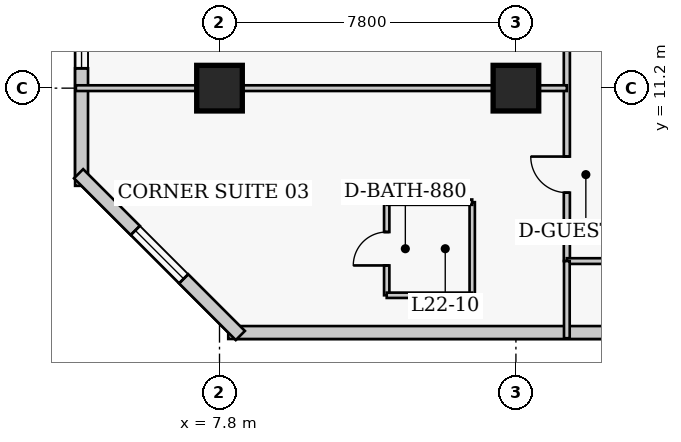
"""IFC4 building model, lengths in metres.
Left out: names, types, materials, properties, quantities, classifications, styles, units other than length and angle.
Written with IfcOpenShell. Run it as: python <this file> out.ifc"""

import sys

from ifc_helpers import new_model, si_unit, direction, frame, frame_2d, origin, origin_2d, place, context, subcontext, project, spatial, rectangle, extrude, element, fill, save


model = new_model("IFC4")
c1 = context("Model", 3, precision=1e-05, world=origin(), true_north=direction((0.0, 1.0)))
c2 = subcontext(c1, "Body", "Model", "MODEL_VIEW")
j1 = project(units=[si_unit("LENGTHUNIT", "METRE"), si_unit("PLANEANGLEUNIT", "RADIAN")], contexts=[c1])
p1 = place(None, origin())
s1 = spatial("IfcSite", under=j1, at=p1, CompositionType="ELEMENT")
p2 = place(p1, origin())
s2 = spatial("IfcBuilding", under=s1, at=p2, CompositionType="ELEMENT")
p3 = place(p2, frame((0.0, 0.0, 91.8)))
s3 = spatial("IfcBuildingStorey", under=s2, at=p3, CompositionType="ELEMENT", Elevation=91.8)
for number, where, z_axis, x_axis in (
    (1, (7.8, 11.2, 0.0), (0.0, 0.0, 1.0), (1.0, 0.0, 0.0)),
    (2, (15.6, 11.2, 0.0), (0.0, 0.0, 1.0), (1.0, 0.0, 0.0)),
):
    element("IfcColumn", number, at=place(p3, frame(where, z_axis=z_axis, x_axis=x_axis)), inside=s3, PredefinedType="COLUMN", context=c2, shape_type="SweptSolid", body=[
        extrude(rectangle(XDim=1.2, YDim=1.2, at=origin_2d()), origin(), (0.0, 0.0, 1.0), 3.8),
    ])
p4 = place(p3, frame((8.03, 4.77, 0.0), z_axis=(0.0, 0.0, 1.0), x_axis=(1.0, 0.0, 0.0)))
e3 = element("IfcWall", 3, at=p4, inside=s3, PredefinedType="SOLIDWALL", context=c2, shape_type="SweptSolid", body=[
    extrude(rectangle(XDim=28.29, YDim=0.34, at=frame_2d((14.145, 0.0))), origin(), (0.0, 0.0, 1.0), 3.54),
])
p5 = place(p4, frame((12.595, 0.0, 0.85)))
e4 = element("IfcOpeningElement", 4, at=p5, cuts=e3, PredefinedType="OPENING", context=c2, shape_type="SweptSolid", body=[
    extrude(rectangle(XDim=1.8, YDim=1.8, at=frame_2d((0.9, 0.9))), frame((0.0, 0.18, 0.0), z_axis=(0.0, -1.0, 0.0), x_axis=(1.0, 0.0, 0.0)), (0.0, 0.0, 1.0), 0.36),
])
p6 = place(p3, frame((4.17, 40.57, 0.0), z_axis=(0.0, 0.0, 1.0), x_axis=(0.0, -1.0, 0.0)))
e5 = element("IfcWall", 5, at=p6, inside=s3, PredefinedType="SOLIDWALL", context=c2, shape_type="SweptSolid", body=[
    extrude(rectangle(XDim=31.94, YDim=0.34, at=frame_2d((15.97, 0.0))), origin(), (0.0, 0.0, 1.0), 3.54),
])
p7 = place(p6, frame((1.942, 0.0, 0.85)))
e6 = element("IfcOpeningElement", 6, at=p7, cuts=e5, PredefinedType="OPENING", context=c2, shape_type="SweptSolid", body=[
    extrude(rectangle(XDim=1.8, YDim=1.8, at=frame_2d((0.9, 0.9))), frame((0.0, 0.18, 0.0), z_axis=(0.0, -1.0, 0.0), x_axis=(1.0, 0.0, 0.0)), (0.0, 0.0, 1.0), 0.36),
])
p8 = place(p6, frame((12.228, 0.0, 0.85)))
e7 = element("IfcOpeningElement", 7, at=p8, cuts=e5, PredefinedType="OPENING", context=c2, shape_type="SweptSolid", body=[
    extrude(rectangle(XDim=1.8, YDim=1.8, at=frame_2d((0.9, 0.9))), frame((0.0, 0.18, 0.0), z_axis=(0.0, -1.0, 0.0), x_axis=(1.0, 0.0, 0.0)), (0.0, 0.0, 1.0), 0.36),
])
p9 = place(p6, frame((18.413, 0.0, 0.85)))
e8 = element("IfcOpeningElement", 8, at=p9, cuts=e5, PredefinedType="OPENING", context=c2, shape_type="SweptSolid", body=[
    extrude(rectangle(XDim=1.8, YDim=1.8, at=frame_2d((0.9, 0.9))), frame((0.0, 0.18, 0.0), z_axis=(0.0, -1.0, 0.0), x_axis=(1.0, 0.0, 0.0)), (0.0, 0.0, 1.0), 0.36),
])
p10 = place(p6, frame((27.048, 0.0, 0.85)))
e9 = element("IfcOpeningElement", 9, at=p10, cuts=e5, PredefinedType="OPENING", context=c2, shape_type="SweptSolid", body=[
    extrude(rectangle(XDim=1.8, YDim=1.8, at=frame_2d((0.9, 0.9))), frame((0.0, 0.18, 0.0), z_axis=(0.0, -1.0, 0.0), x_axis=(1.0, 0.0, 0.0)), (0.0, 0.0, 1.0), 0.36),
])
p11 = place(p6, frame((7.46, 0.0, 0.85)))
e10 = element("IfcOpeningElement", 10, at=p11, cuts=e5, PredefinedType="OPENING", context=c2, shape_type="SweptSolid", body=[
    extrude(rectangle(XDim=1.3, YDim=1.7, at=frame_2d((0.65, 0.85))), frame((0.0, 0.18, 0.0), z_axis=(0.0, -1.0, 0.0), x_axis=(1.0, 0.0, 0.0)), (0.0, 0.0, 1.0), 0.36),
])
p12 = place(p3, frame((4.092, 8.948, 0.0), z_axis=(0.0, 0.0, 1.0), x_axis=(0.707106781187, -0.707106781187, 0.0)))
e11 = element("IfcWall", 11, at=p12, inside=s3, PredefinedType="SOLIDWALL", context=c2, shape_type="SweptSolid", body=[
    extrude(rectangle(XDim=6.02, YDim=0.34, at=frame_2d((3.01, 0.0))), origin(), (0.0, 0.0, 1.0), 3.54),
])
p13 = place(p12, frame((2.11, 0.0, 0.85)))
e12 = element("IfcOpeningElement", 12, at=p13, cuts=e11, PredefinedType="OPENING", context=c2, shape_type="SweptSolid", body=[
    extrude(rectangle(XDim=1.8, YDim=1.8, at=frame_2d((0.9, 0.9))), frame((0.0, 0.18, 0.0), z_axis=(0.0, -1.0, 0.0), x_axis=(1.0, 0.0, 0.0)), (0.0, 0.0, 1.0), 0.36),
])
p14 = place(p3, frame((16.94, 6.65, 0.0), z_axis=(0.0, 0.0, 1.0), x_axis=(0.0, 1.0, 0.0)))
e13 = element("IfcWall", 13, at=p14, inside=s3, PredefinedType="PARTITIONING", context=c2, shape_type="SweptSolid", body=[
    extrude(rectangle(XDim=34.0, YDim=0.16, at=frame_2d((17.0, 0.0))), origin(), (0.0, 0.0, 1.0), 3.54),
])
p15 = place(p14, frame((1.8, 0.0, 0.0)))
e14 = element("IfcOpeningElement", 14, at=p15, cuts=e13, PredefinedType="OPENING", context=c2, shape_type="SweptSolid", body=[
    extrude(rectangle(XDim=0.95, YDim=2.1, at=frame_2d((0.475, 1.05))), frame((0.0, 0.09, 0.0), z_axis=(0.0, -1.0, 0.0), x_axis=(1.0, 0.0, 0.0)), (0.0, 0.0, 1.0), 0.18),
])
p16 = place(p14, frame((8.475, 0.0, 0.0)))
e15 = element("IfcOpeningElement", 15, at=p16, cuts=e13, PredefinedType="OPENING", context=c2, shape_type="SweptSolid", body=[
    extrude(rectangle(XDim=0.95, YDim=2.1, at=frame_2d((0.475, 1.05))), frame((0.0, 0.09, 0.0), z_axis=(0.0, -1.0, 0.0), x_axis=(1.0, 0.0, 0.0)), (0.0, 0.0, 1.0), 0.18),
])
p17 = place(p14, frame((17.275, 0.0, 0.0)))
e16 = element("IfcOpeningElement", 16, at=p17, cuts=e13, PredefinedType="OPENING", context=c2, shape_type="SweptSolid", body=[
    extrude(rectangle(XDim=0.95, YDim=2.1, at=frame_2d((0.475, 1.05))), frame((0.0, 0.09, 0.0), z_axis=(0.0, -1.0, 0.0), x_axis=(1.0, 0.0, 0.0)), (0.0, 0.0, 1.0), 0.18),
])
p18 = place(p14, frame((25.325, 0.0, 0.0)))
e17 = element("IfcOpeningElement", 17, at=p18, cuts=e13, PredefinedType="OPENING", context=c2, shape_type="SweptSolid", body=[
    extrude(rectangle(XDim=0.95, YDim=2.1, at=frame_2d((0.475, 1.05))), frame((0.0, 0.09, 0.0), z_axis=(0.0, -1.0, 0.0), x_axis=(1.0, 0.0, 0.0)), (0.0, 0.0, 1.0), 0.18),
])
p19 = place(p14, frame((32.56, 0.0, 0.0)))
e18 = element("IfcOpeningElement", 18, at=p19, cuts=e13, PredefinedType="OPENING", context=c2, shape_type="SweptSolid", body=[
    extrude(rectangle(XDim=1.0, YDim=2.15, at=frame_2d((0.5, 1.075))), frame((0.0, 0.09, 0.0), z_axis=(0.0, -1.0, 0.0), x_axis=(1.0, 0.0, 0.0)), (0.0, 0.0, 1.0), 0.18),
])
p20 = place(p3, frame((16.94, 6.65, 0.0), z_axis=(0.0, 0.0, 1.0), x_axis=(1.0, 0.0, 0.0)))
e19 = element("IfcWall", 19, at=p20, inside=s3, PredefinedType="PARTITIONING", context=c2, shape_type="SweptSolid", body=[
    extrude(rectangle(XDim=2.22, YDim=0.15, at=frame_2d((1.11, 0.0))), origin(), (0.0, 0.0, 1.0), 3.54),
])
p21 = place(p3, frame((16.94, 4.62, 0.0), z_axis=(0.0, 0.0, 1.0), x_axis=(0.0, 1.0, 0.0)))
e20 = element("IfcWall", 20, at=p21, inside=s3, PredefinedType="PARTITIONING", context=c2, shape_type="SweptSolid", body=[
    extrude(rectangle(XDim=2.03, YDim=0.15, at=frame_2d((1.015, 0.0))), origin(), (0.0, 0.0, 1.0), 3.54),
])
p22 = place(p3, frame((12.2, 5.75, 0.0), z_axis=(0.0, 0.0, 1.0), x_axis=(0.0, 1.0, 0.0)))
e21 = element("IfcWall", 21, at=p22, inside=s3, PredefinedType="PLUMBINGWALL", context=c2, shape_type="SweptSolid", body=[
    extrude(rectangle(XDim=2.45, YDim=0.14, at=frame_2d((1.225, 0.0))), origin(), (0.0, 0.0, 1.0), 3.54),
])
p23 = place(p22, frame((0.785, 0.0, 0.0)))
e22 = element("IfcOpeningElement", 22, at=p23, cuts=e21, PredefinedType="OPENING", context=c2, shape_type="SweptSolid", body=[
    extrude(rectangle(XDim=0.88, YDim=2.05, at=frame_2d((0.44, 1.025))), frame((0.0, 0.08, 0.0), z_axis=(0.0, -1.0, 0.0), x_axis=(1.0, 0.0, 0.0)), (0.0, 0.0, 1.0), 0.16),
])
p24 = place(p3, frame((14.45, 5.75, 0.0), z_axis=(0.0, 0.0, 1.0), x_axis=(0.0, 1.0, 0.0)))
e23 = element("IfcWall", 23, at=p24, inside=s3, PredefinedType="PLUMBINGWALL", context=c2, shape_type="SweptSolid", body=[
    extrude(rectangle(XDim=2.45, YDim=0.14, at=frame_2d((1.225, 0.0))), origin(), (0.0, 0.0, 1.0), 3.54),
])
for number, where, z_axis, x_axis in (
    (24, (12.2, 5.75, 0.0), (0.0, 0.0, 1.0), (1.0, 0.0, 0.0)),
    (25, (12.2, 8.2, 0.0), (0.0, 0.0, 1.0), (1.0, 0.0, 0.0)),
):
    element("IfcWall", number, at=place(p3, frame(where, z_axis=z_axis, x_axis=x_axis)), inside=s3, PredefinedType="PLUMBINGWALL", context=c2, shape_type="SweptSolid", body=[
        extrude(rectangle(XDim=2.25, YDim=0.14, at=frame_2d((1.125, 0.0))), origin(), (0.0, 0.0, 1.0), 3.54),
    ])
p25 = place(p3, frame((4.02, 11.2, 0.0), z_axis=(0.0, 0.0, 1.0), x_axis=(1.0, 0.0, 0.0)))
e26 = element("IfcWall", 26, at=p25, inside=s3, PredefinedType="PARTITIONING", context=c2, shape_type="SweptSolid", body=[
    extrude(rectangle(XDim=12.92, YDim=0.15, at=frame_2d((6.46, 0.0))), origin(), (0.0, 0.0, 1.0), 2.679),
])
p26 = place(p10, origin())
e27 = element("IfcWindow", 27, at=p26, inside=s3, PartitioningType="SINGLE_PANEL", PredefinedType="WINDOW", context=c2, shape_type="SweptSolid", body=[
    extrude(rectangle(XDim=1.8, YDim=1.8, at=frame_2d((0.9, 0.9))), frame((0.0, 0.03, 0.0), z_axis=(0.0, -1.0, 0.0), x_axis=(1.0, 0.0, 0.0)), (0.0, 0.0, 1.0), 0.06),
])
fill(e9, e27)
p27 = place(p13, origin())
e28 = element("IfcWindow", 28, at=p27, inside=s3, PartitioningType="SINGLE_PANEL", PredefinedType="WINDOW", context=c2, shape_type="SweptSolid", body=[
    extrude(rectangle(XDim=1.8, YDim=1.8, at=frame_2d((0.9, 0.9))), frame((0.0, 0.03, 0.0), z_axis=(0.0, -1.0, 0.0), x_axis=(1.0, 0.0, 0.0)), (0.0, 0.0, 1.0), 0.06),
])
fill(e12, e28)
p28 = place(p23, origin())
e29 = element("IfcDoor", 29, at=p28, inside=s3, OperationType="SINGLE_SWING_LEFT", PredefinedType="DOOR", context=c2, shape_type="SweptSolid", body=[
    extrude(rectangle(XDim=0.88, YDim=2.05, at=frame_2d((0.44, 1.025))), frame((0.0, 0.025, 0.0), z_axis=(0.0, -1.0, 0.0), x_axis=(1.0, 0.0, 0.0)), (0.0, 0.0, 1.0), 0.05),
])
fill(e22, e29)
p29 = place(p15, origin())
e30 = element("IfcDoor", 30, at=p29, inside=s3, OperationType="SINGLE_SWING_RIGHT", PredefinedType="DOOR", context=c2, shape_type="SweptSolid", body=[
    extrude(rectangle(XDim=0.95, YDim=2.1, at=frame_2d((0.475, 1.05))), frame((0.0, 0.025, 0.0), z_axis=(0.0, -1.0, 0.0), x_axis=(1.0, 0.0, 0.0)), (0.0, 0.0, 1.0), 0.05),
])
fill(e14, e30)
save(model, sys.argv[1])
